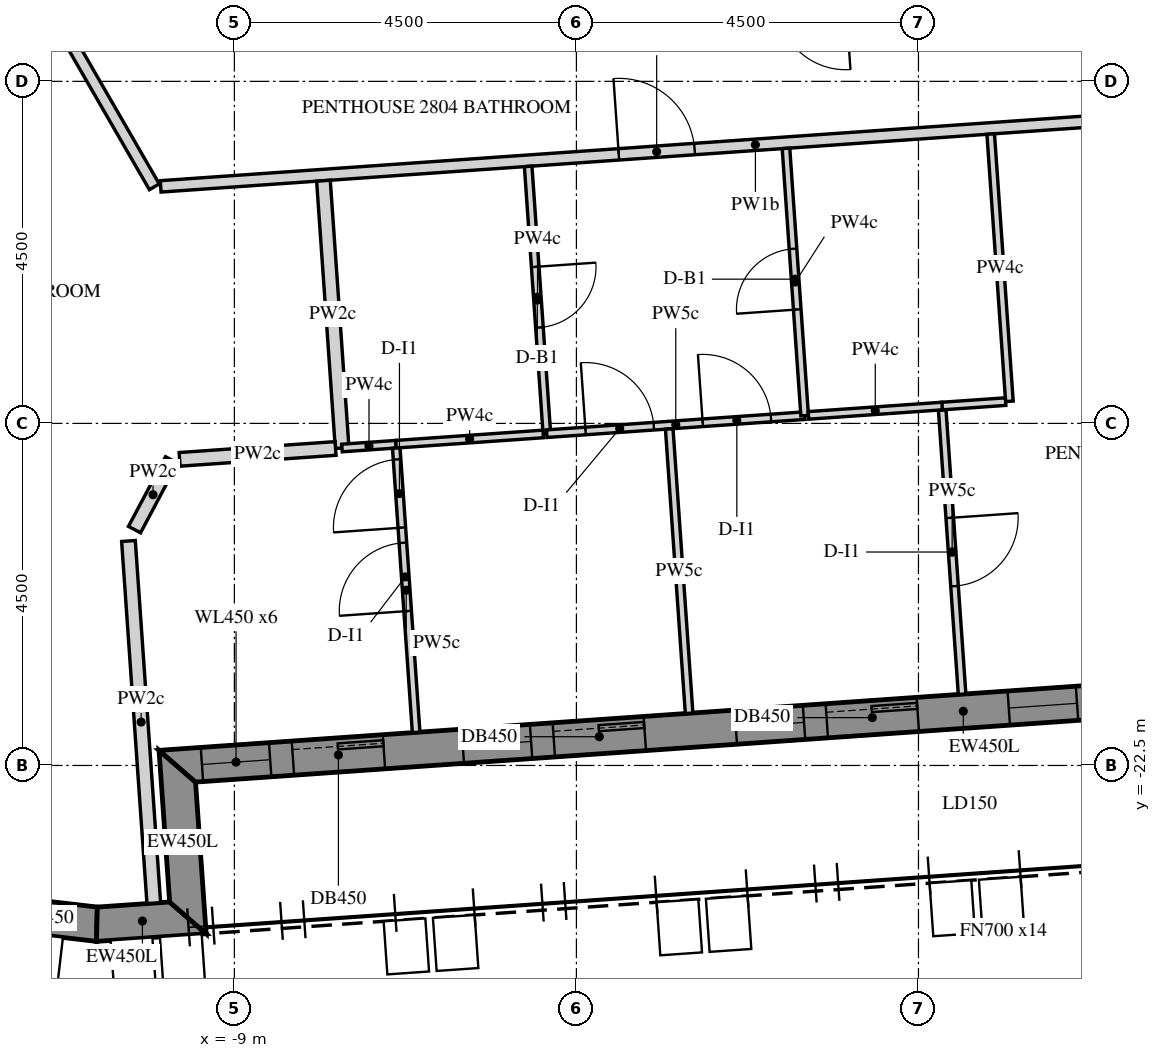
"""IFC4 building model, lengths in metres.
Left out: names, types, materials, properties, quantities, classifications, styles, units other than length and angle.
Written with IfcOpenShell. Run it as: python <this file> out.ifc"""

import sys

from ifc_helpers import new_model, si_unit, direction, frame, frame_2d, origin, place, context, subcontext, project, spatial, polyline, rectangle, outline, extrude, element, fill, save


model = new_model("IFC4")
c1 = context("Model", 3, precision=1e-05, world=origin(), true_north=direction((0.0, 1.0)))
c2 = subcontext(c1, "Body", "Model", "MODEL_VIEW")
j1 = project(units=[si_unit("LENGTHUNIT", "METRE"), si_unit("PLANEANGLEUNIT", "RADIAN")], contexts=[c1])
p1 = place(None, origin())
s1 = spatial("IfcSite", under=j1, at=p1, CompositionType="ELEMENT")
p2 = place(p1, origin())
s2 = spatial("IfcBuilding", under=s1, at=p2, CompositionType="ELEMENT")
p3 = place(p2, frame((0.0, 0.0, 361.2)))
s3 = spatial("IfcBuildingStorey", under=s2, at=p3, CompositionType="ELEMENT", Elevation=361.2)
p4 = place(p3, frame((-12.197, -24.427, -0.15), z_axis=(0.0, 0.0, 1.0), x_axis=(0.993227902261, -0.116182331575, 0.0)))
e1 = element("IfcWall", 1, at=p4, inside=s3, PredefinedType="SOLIDWALL", context=c2, shape_type="SweptSolid", body=[
    extrude(outline(polyline([(-0.042, -0.225), (1.418, -0.225), (1.376, 0.225), (0.042, 0.225), (-0.042, -0.225)])), origin(), (0.0, 0.0, 1.0), 3.9),
])
p5 = place(p3, frame((-10.809, -24.589, -0.15), z_axis=(0.0, 0.0, 1.0), x_axis=(0.997562933087, 0.069772448216, 0.0)))
e2 = element("IfcWall", 2, at=p5, inside=s3, PredefinedType="SOLIDWALL", context=c2, shape_type="SweptSolid", body=[
    extrude(outline(polyline([(-0.021, -0.225), (1.425, -0.225), (0.975, 0.225), (0.021, 0.225), (-0.021, -0.225)])), origin(), (0.0, 0.0, 1.0), 3.9),
])
p6 = place(p3, frame((-9.611, -24.505, -0.15), z_axis=(0.0, 0.0, 1.0), x_axis=(-0.069824268692, 0.99755930726, 0.0)))
e3 = element("IfcWall", 3, at=p6, inside=s3, PredefinedType="SOLIDWALL", context=c2, shape_type="SweptSolid", body=[
    extrude(outline(polyline([(-0.225, -0.225), (1.775, -0.225), (2.225, 0.225), (0.225, 0.225), (-0.225, -0.225)])), origin(), (0.0, 0.0, 1.0), 3.9),
])
p7 = place(p3, frame((-9.751, -22.51, -0.15), z_axis=(0.0, 0.0, 1.0), x_axis=(0.997564460173, 0.06975061147, 0.0)))
e4 = element("IfcWall", 4, at=p7, inside=s3, PredefinedType="SOLIDWALL", context=c2, shape_type="SweptSolid", body=[
    extrude(outline(polyline([(0.225, -0.225), (20.507, -0.225), (20.957, 0.225), (-0.225, 0.225), (0.225, -0.225)])), origin(), (0.0, 0.0, 1.0), 3.9),
])
p8 = place(p7, frame((0.325, 0.0, 1.05)))
e5 = element("IfcOpeningElement", 5, at=p8, cuts=e4, PredefinedType="OPENING", context=c2, shape_type="SweptSolid", body=[
    extrude(rectangle(XDim=0.9, YDim=1.5, at=frame_2d((0.45, 0.75))), frame((0.0, 0.235, 0.0), z_axis=(0.0, -1.0, 0.0), x_axis=(1.0, 0.0, 0.0)), (0.0, 0.0, 1.0), 0.47),
])
p9 = place(p7, frame((1.525, 0.0, 0.15)))
e6 = element("IfcOpeningElement", 6, at=p9, cuts=e4, PredefinedType="OPENING", context=c2, shape_type="SweptSolid", body=[
    extrude(rectangle(XDim=1.2, YDim=2.4, at=frame_2d((0.6, 1.2))), frame((0.0, 0.235, 0.0), z_axis=(0.0, -1.0, 0.0), x_axis=(1.0, 0.0, 0.0)), (0.0, 0.0, 1.0), 0.47),
])
p10 = place(p7, frame((3.766, 0.0, 1.05)))
e7 = element("IfcOpeningElement", 7, at=p10, cuts=e4, PredefinedType="OPENING", context=c2, shape_type="SweptSolid", body=[
    extrude(rectangle(XDim=0.9, YDim=1.5, at=frame_2d((0.45, 0.75))), frame((0.0, 0.235, 0.0), z_axis=(0.0, -1.0, 0.0), x_axis=(1.0, 0.0, 0.0)), (0.0, 0.0, 1.0), 0.47),
])
p11 = place(p7, frame((4.966, 0.0, 0.15)))
e8 = element("IfcOpeningElement", 8, at=p11, cuts=e4, PredefinedType="OPENING", context=c2, shape_type="SweptSolid", body=[
    extrude(rectangle(XDim=1.2, YDim=2.4, at=frame_2d((0.6, 1.2))), frame((0.0, 0.235, 0.0), z_axis=(0.0, -1.0, 0.0), x_axis=(1.0, 0.0, 0.0)), (0.0, 0.0, 1.0), 0.47),
])
p12 = place(p7, frame((7.366, 0.0, 1.05)))
e9 = element("IfcOpeningElement", 9, at=p12, cuts=e4, PredefinedType="OPENING", context=c2, shape_type="SweptSolid", body=[
    extrude(rectangle(XDim=0.9, YDim=1.5, at=frame_2d((0.45, 0.75))), frame((0.0, 0.235, 0.0), z_axis=(0.0, -1.0, 0.0), x_axis=(1.0, 0.0, 0.0)), (0.0, 0.0, 1.0), 0.47),
])
p13 = place(p7, frame((8.566, 0.0, 0.15)))
e10 = element("IfcOpeningElement", 10, at=p13, cuts=e4, PredefinedType="OPENING", context=c2, shape_type="SweptSolid", body=[
    extrude(rectangle(XDim=1.2, YDim=2.4, at=frame_2d((0.6, 1.2))), frame((0.0, 0.235, 0.0), z_axis=(0.0, -1.0, 0.0), x_axis=(1.0, 0.0, 0.0)), (0.0, 0.0, 1.0), 0.47),
])
p14 = place(p7, frame((10.966, 0.0, 1.05)))
e11 = element("IfcOpeningElement", 11, at=p14, cuts=e4, PredefinedType="OPENING", context=c2, shape_type="SweptSolid", body=[
    extrude(rectangle(XDim=0.9, YDim=1.5, at=frame_2d((0.45, 0.75))), frame((0.0, 0.235, 0.0), z_axis=(0.0, -1.0, 0.0), x_axis=(1.0, 0.0, 0.0)), (0.0, 0.0, 1.0), 0.47),
])
p15 = place(p7, frame((12.166, 0.0, 0.15)))
e12 = element("IfcOpeningElement", 12, at=p15, cuts=e4, PredefinedType="OPENING", context=c2, shape_type="SweptSolid", body=[
    extrude(rectangle(XDim=1.2, YDim=2.4, at=frame_2d((0.6, 1.2))), frame((0.0, 0.235, 0.0), z_axis=(0.0, -1.0, 0.0), x_axis=(1.0, 0.0, 0.0)), (0.0, 0.0, 1.0), 0.47),
])
p16 = place(p7, frame((14.566, 0.0, 1.05)))
e13 = element("IfcOpeningElement", 13, at=p16, cuts=e4, PredefinedType="OPENING", context=c2, shape_type="SweptSolid", body=[
    extrude(rectangle(XDim=0.9, YDim=1.5, at=frame_2d((0.45, 0.75))), frame((0.0, 0.235, 0.0), z_axis=(0.0, -1.0, 0.0), x_axis=(1.0, 0.0, 0.0)), (0.0, 0.0, 1.0), 0.47),
])
p17 = place(p7, frame((15.766, 0.0, 0.15)))
e14 = element("IfcOpeningElement", 14, at=p17, cuts=e4, PredefinedType="OPENING", context=c2, shape_type="SweptSolid", body=[
    extrude(rectangle(XDim=1.2, YDim=2.4, at=frame_2d((0.6, 1.2))), frame((0.0, 0.235, 0.0), z_axis=(0.0, -1.0, 0.0), x_axis=(1.0, 0.0, 0.0)), (0.0, 0.0, 1.0), 0.47),
])
p18 = place(p7, frame((18.007, 0.0, 1.05)))
e15 = element("IfcOpeningElement", 15, at=p18, cuts=e4, PredefinedType="OPENING", context=c2, shape_type="SweptSolid", body=[
    extrude(rectangle(XDim=0.9, YDim=1.5, at=frame_2d((0.45, 0.75))), frame((0.0, 0.235, 0.0), z_axis=(0.0, -1.0, 0.0), x_axis=(1.0, 0.0, 0.0)), (0.0, 0.0, 1.0), 0.47),
])
p19 = place(p7, frame((19.207, 0.0, 0.15)))
e16 = element("IfcOpeningElement", 16, at=p19, cuts=e4, PredefinedType="OPENING", context=c2, shape_type="SweptSolid", body=[
    extrude(rectangle(XDim=1.2, YDim=2.4, at=frame_2d((0.6, 1.2))), frame((0.0, 0.235, 0.0), z_axis=(0.0, -1.0, 0.0), x_axis=(1.0, 0.0, 0.0)), (0.0, 0.0, 1.0), 0.47),
])
p20 = place(p3, frame((-17.036, -2.792, 0.0), z_axis=(0.0, 0.0, 1.0), x_axis=(0.500006428338, -0.86602169235, 0.0)))
e17 = element("IfcWall", 17, at=p20, inside=s3, PredefinedType="PARTITIONING", context=c2, shape_type="SweptSolid", body=[
    extrude(rectangle(XDim=13.966, YDim=0.15, at=frame_2d((6.983, 0.0))), origin(), (0.0, 0.0, 1.0), 2.82),
])
p21 = place(p20, frame((3.325, 0.0, 0.0)))
e18 = element("IfcOpeningElement", 18, at=p21, cuts=e17, PredefinedType="OPENING", context=c2, shape_type="SweptSolid", body=[
    extrude(rectangle(XDim=1.0, YDim=2.1, at=frame_2d((0.5, 1.05))), frame((0.0, 0.085, 0.0), z_axis=(0.0, -1.0, 0.0), x_axis=(1.0, 0.0, 0.0)), (0.0, 0.0, 1.0), 0.17),
])
p22 = place(p3, frame((-9.97, -14.882, 0.0), z_axis=(0.0, 0.0, 1.0), x_axis=(0.997564384496, 0.06975169378, 0.0)))
e19 = element("IfcWall", 19, at=p22, inside=s3, PredefinedType="PARTITIONING", context=c2, shape_type="SweptSolid", body=[
    extrude(rectangle(XDim=15.688, YDim=0.15, at=frame_2d((7.844, 0.0))), origin(), (0.0, 0.0, 1.0), 2.82),
])
p23 = place(p22, frame((6.042, 0.0, 0.0)))
e20 = element("IfcOpeningElement", 20, at=p23, cuts=e19, PredefinedType="OPENING", context=c2, shape_type="SweptSolid", body=[
    extrude(rectangle(XDim=1.0, YDim=2.1, at=frame_2d((0.5, 1.05))), frame((0.0, 0.085, 0.0), z_axis=(0.0, -1.0, 0.0), x_axis=(1.0, 0.0, 0.0)), (0.0, 0.0, 1.0), 0.17),
])
p24 = place(p3, frame((-7.582, -18.323, 0.0), z_axis=(0.0, 0.0, 1.0), x_axis=(-0.069745730407, 0.997564801449, 0.0)))
e21 = element("IfcWall", 21, at=p24, inside=s3, PredefinedType="PARTITIONING", context=c2, shape_type="SweptSolid", body=[
    extrude(rectangle(XDim=3.525, YDim=0.18, at=frame_2d((1.762, 0.0))), origin(), (0.0, 0.0, 1.0), 2.82),
])
p25 = place(p3, frame((-10.06, -24.311, 0.0), z_axis=(0.0, 0.0, 1.0), x_axis=(-0.069731958306, 0.997565764244, 0.0)))
e22 = element("IfcWall", 22, at=p25, inside=s3, PredefinedType="PARTITIONING", context=c2, shape_type="SweptSolid", body=[
    extrude(rectangle(XDim=4.776, YDim=0.18, at=frame_2d((2.388, 0.0))), origin(), (0.0, 0.0, 1.0), 2.82),
])
p26 = place(p3, frame((-10.314, -19.397, 0.0), z_axis=(0.0, 0.0, 1.0), x_axis=(0.469550580753, 0.882905573725, 0.0)))
e23 = element("IfcWall", 23, at=p26, inside=s3, PredefinedType="PARTITIONING", context=c2, shape_type="SweptSolid", body=[
    extrude(rectangle(XDim=1.038, YDim=0.18, at=frame_2d((0.519, 0.0))), origin(), (0.0, 0.0, 1.0), 2.82),
])
p27 = place(p3, frame((-9.72, -18.473, 0.0), z_axis=(0.0, 0.0, 1.0), x_axis=(0.997561859931, 0.069787789844, 0.0)))
e24 = element("IfcWall", 24, at=p27, inside=s3, PredefinedType="PARTITIONING", context=c2, shape_type="SweptSolid", body=[
    extrude(rectangle(XDim=2.057, YDim=0.18, at=frame_2d((1.029, 0.0))), origin(), (0.0, 0.0, 1.0), 2.82),
])
p28 = place(p3, frame((0.312, -17.822, 0.0), z_axis=(0.0, 0.0, 1.0), x_axis=(0.069789608916, -0.99756173267, 0.0)))
e25 = element("IfcWall", 25, at=p28, inside=s3, PredefinedType="PARTITIONING", context=c2, shape_type="SweptSolid", body=[
    extrude(rectangle(XDim=3.75, YDim=0.1, at=frame_2d((1.875, 0.0))), origin(), (0.0, 0.0, 1.0), 2.82),
])
p29 = place(p28, frame((1.425, 0.0, 0.0)))
e26 = element("IfcOpeningElement", 26, at=p29, cuts=e25, PredefinedType="OPENING", context=c2, shape_type="SweptSolid", body=[
    extrude(rectangle(XDim=0.9, YDim=2.1, at=frame_2d((0.45, 1.05))), frame((0.0, 0.06, 0.0), z_axis=(0.0, -1.0, 0.0), x_axis=(1.0, 0.0, 0.0)), (0.0, 0.0, 1.0), 0.12),
])
p30 = place(p3, frame((0.95, -14.193, 0.0), z_axis=(0.0, 0.0, 1.0), x_axis=(0.069745730407, -0.997564801449, 0.0)))
e27 = element("IfcWall", 27, at=p30, inside=s3, PredefinedType="PARTITIONING", context=c2, shape_type="SweptSolid", body=[
    extrude(rectangle(XDim=3.525, YDim=0.1, at=frame_2d((1.762, 0.0))), origin(), (0.0, 0.0, 1.0), 2.82),
])
p31 = place(p3, frame((1.146, -17.713, 0.0), z_axis=(0.0, 0.0, 1.0), x_axis=(-0.997553508491, -0.069907064713, 0.0)))
e28 = element("IfcWall", 28, at=p31, inside=s3, PredefinedType="PARTITIONING", context=c2, shape_type="SweptSolid", body=[
    extrude(rectangle(XDim=0.842, YDim=0.1, at=frame_2d((0.421, 0.0))), origin(), (0.0, 0.0, 1.0), 2.82),
])
p32 = place(p3, frame((-5.135, -14.619, 0.0), z_axis=(0.0, 0.0, 1.0), x_axis=(0.069814653895, -0.997559980202, 0.0)))
e29 = element("IfcWall", 29, at=p32, inside=s3, PredefinedType="PARTITIONING", context=c2, shape_type="SweptSolid", body=[
    extrude(rectangle(XDim=3.525, YDim=0.1, at=frame_2d((1.762, 0.0))), origin(), (0.0, 0.0, 1.0), 2.82),
])
p33 = place(p32, frame((1.325, 0.0, 0.0)))
e30 = element("IfcOpeningElement", 30, at=p33, cuts=e29, PredefinedType="OPENING", context=c2, shape_type="SweptSolid", body=[
    extrude(rectangle(XDim=0.8, YDim=2.1, at=frame_2d((0.4, 1.05))), frame((0.0, 0.06, 0.0), z_axis=(0.0, -1.0, 0.0), x_axis=(1.0, 0.0, 0.0)), (0.0, 0.0, 1.0), 0.12),
])
p34 = place(p3, frame((-4.891, -18.135, 0.0), z_axis=(0.0, 0.0, 1.0), x_axis=(0.997567103819, 0.069712792071, 0.0)))
e31 = element("IfcWall", 31, at=p34, inside=s3, PredefinedType="PARTITIONING", context=c2, shape_type="SweptSolid", body=[
    extrude(rectangle(XDim=3.404, YDim=0.1, at=frame_2d((1.702, 0.0))), origin(), (0.0, 0.0, 1.0), 2.82),
])
p35 = place(p34, frame((0.512, 0.0, 0.0)))
e32 = element("IfcOpeningElement", 32, at=p35, cuts=e31, PredefinedType="OPENING", context=c2, shape_type="SweptSolid", body=[
    extrude(rectangle(XDim=0.9, YDim=2.1, at=frame_2d((0.45, 1.05))), frame((0.0, 0.06, 0.0), z_axis=(0.0, -1.0, 0.0), x_axis=(1.0, 0.0, 0.0)), (0.0, 0.0, 1.0), 0.12),
])
p36 = place(p34, frame((2.057, 0.0, 0.0)))
e33 = element("IfcOpeningElement", 33, at=p36, cuts=e31, PredefinedType="OPENING", context=c2, shape_type="SweptSolid", body=[
    extrude(rectangle(XDim=0.9, YDim=2.1, at=frame_2d((0.45, 1.05))), frame((0.0, 0.06, 0.0), z_axis=(0.0, -1.0, 0.0), x_axis=(1.0, 0.0, 0.0)), (0.0, 0.0, 1.0), 0.12),
])
p37 = place(p3, frame((-1.497, -17.898, 0.0), z_axis=(0.0, 0.0, 1.0), x_axis=(-0.069745730407, 0.997564801449, 0.0)))
e34 = element("IfcWall", 34, at=p37, inside=s3, PredefinedType="PARTITIONING", context=c2, shape_type="SweptSolid", body=[
    extrude(rectangle(XDim=3.525, YDim=0.1, at=frame_2d((1.762, 0.0))), origin(), (0.0, 0.0, 1.0), 2.82),
])
p38 = place(p37, frame((1.4, 0.0, 0.0)))
e35 = element("IfcOpeningElement", 35, at=p38, cuts=e34, PredefinedType="OPENING", context=c2, shape_type="SweptSolid", body=[
    extrude(rectangle(XDim=0.8, YDim=2.1, at=frame_2d((0.4, 1.05))), frame((0.0, 0.06, 0.0), z_axis=(0.0, -1.0, 0.0), x_axis=(1.0, 0.0, 0.0)), (0.0, 0.0, 1.0), 0.12),
])
p39 = place(p3, frame((-7.584, -18.324, 0.0), z_axis=(0.0, 0.0, 1.0), x_axis=(0.997553473746, 0.06990756051, 0.0)))
e36 = element("IfcWall", 36, at=p39, inside=s3, PredefinedType="PARTITIONING", context=c2, shape_type="SweptSolid", body=[
    extrude(rectangle(XDim=0.712, YDim=0.1, at=frame_2d((0.356, 0.0))), origin(), (0.0, 0.0, 1.0), 2.82),
])
p40 = place(p3, frame((-6.874, -18.274, 0.0), z_axis=(0.0, 0.0, 1.0), x_axis=(0.997562294187, 0.069781582212, 0.0)))
e37 = element("IfcWall", 37, at=p40, inside=s3, PredefinedType="PARTITIONING", context=c2, shape_type="SweptSolid", body=[
    extrude(rectangle(XDim=1.942, YDim=0.1, at=frame_2d((0.971, 0.0))), origin(), (0.0, 0.0, 1.0), 2.82),
])
p41 = place(p3, frame((-6.609, -22.065, 0.0), z_axis=(0.0, 0.0, 1.0), x_axis=(-0.069729351823, 0.997565946439, 0.0)))
e38 = element("IfcWall", 38, at=p41, inside=s3, PredefinedType="PARTITIONING", context=c2, shape_type="SweptSolid", body=[
    extrude(rectangle(XDim=3.75, YDim=0.1, at=frame_2d((1.875, 0.0))), origin(), (0.0, 0.0, 1.0), 2.82),
])
p42 = place(p41, frame((2.7, 0.0, 0.0)))
e39 = element("IfcOpeningElement", 39, at=p42, cuts=e38, PredefinedType="OPENING", context=c2, shape_type="SweptSolid", body=[
    extrude(rectangle(XDim=0.9, YDim=2.1, at=frame_2d((0.45, 1.05))), frame((0.0, 0.06, 0.0), z_axis=(0.0, -1.0, 0.0), x_axis=(1.0, 0.0, 0.0)), (0.0, 0.0, 1.0), 0.12),
])
p43 = place(p41, frame((1.6, 0.0, 0.0)))
e40 = element("IfcOpeningElement", 40, at=p43, cuts=e38, PredefinedType="OPENING", context=c2, shape_type="SweptSolid", body=[
    extrude(rectangle(XDim=0.9, YDim=2.1, at=frame_2d((0.45, 1.05))), frame((0.0, 0.06, 0.0), z_axis=(0.0, -1.0, 0.0), x_axis=(1.0, 0.0, 0.0)), (0.0, 0.0, 1.0), 0.12),
])
p44 = place(p3, frame((-3.017, -21.814, 0.0), z_axis=(0.0, 0.0, 1.0), x_axis=(-0.069724823314, 0.997566262969, 0.0)))
e41 = element("IfcWall", 41, at=p44, inside=s3, PredefinedType="PARTITIONING", context=c2, shape_type="SweptSolid", body=[
    extrude(rectangle(XDim=3.75, YDim=0.1, at=frame_2d((1.875, 0.0))), origin(), (0.0, 0.0, 1.0), 2.82),
])
p45 = place(p3, frame((0.311, -17.771, 0.0), z_axis=(0.0, 0.0, 1.0), x_axis=(-0.997559642586, -0.069819477831, 0.0)))
e42 = element("IfcWall", 42, at=p45, inside=s3, PredefinedType="PARTITIONING", context=c2, shape_type="SweptSolid", body=[
    extrude(rectangle(XDim=1.762, YDim=0.1, at=frame_2d((0.881, 0.0))), origin(), (0.0, 0.0, 1.0), 2.82),
])
p46 = place(p8, frame((0.0, 0.155, 0.0)))
e43 = element("IfcWindow", 43, at=p46, inside=s3, PartitioningType="SINGLE_PANEL", PredefinedType="WINDOW", context=c2, shape_type="SweptSolid", body=[
    extrude(rectangle(XDim=0.9, YDim=1.5, at=frame_2d((0.45, 0.75))), frame((0.0, 0.03, 0.0), z_axis=(0.0, -1.0, 0.0), x_axis=(1.0, 0.0, 0.0)), (0.0, 0.0, 1.0), 0.06),
])
fill(e5, e43)
p47 = place(p9, frame((0.0, 0.15, 0.0)))
e44 = element("IfcDoor", 44, at=p47, inside=s3, OperationType="SLIDING_TO_LEFT", PredefinedType="DOOR", context=c2, shape_type="SweptSolid", body=[
    extrude(rectangle(XDim=1.2, YDim=2.4, at=frame_2d((0.6, 1.2))), frame((0.0, 0.025, 0.0), z_axis=(0.0, -1.0, 0.0), x_axis=(1.0, 0.0, 0.0)), (0.0, 0.0, 1.0), 0.05),
])
fill(e6, e44)
p48 = place(p10, frame((0.0, 0.155, 0.0)))
e45 = element("IfcWindow", 45, at=p48, inside=s3, PartitioningType="SINGLE_PANEL", PredefinedType="WINDOW", context=c2, shape_type="SweptSolid", body=[
    extrude(rectangle(XDim=0.9, YDim=1.5, at=frame_2d((0.45, 0.75))), frame((0.0, 0.03, 0.0), z_axis=(0.0, -1.0, 0.0), x_axis=(1.0, 0.0, 0.0)), (0.0, 0.0, 1.0), 0.06),
])
fill(e7, e45)
p49 = place(p11, frame((0.0, 0.15, 0.0)))
e46 = element("IfcDoor", 46, at=p49, inside=s3, OperationType="SLIDING_TO_LEFT", PredefinedType="DOOR", context=c2, shape_type="SweptSolid", body=[
    extrude(rectangle(XDim=1.2, YDim=2.4, at=frame_2d((0.6, 1.2))), frame((0.0, 0.025, 0.0), z_axis=(0.0, -1.0, 0.0), x_axis=(1.0, 0.0, 0.0)), (0.0, 0.0, 1.0), 0.05),
])
fill(e8, e46)
p50 = place(p12, frame((0.0, 0.155, 0.0)))
e47 = element("IfcWindow", 47, at=p50, inside=s3, PartitioningType="SINGLE_PANEL", PredefinedType="WINDOW", context=c2, shape_type="SweptSolid", body=[
    extrude(rectangle(XDim=0.9, YDim=1.5, at=frame_2d((0.45, 0.75))), frame((0.0, 0.03, 0.0), z_axis=(0.0, -1.0, 0.0), x_axis=(1.0, 0.0, 0.0)), (0.0, 0.0, 1.0), 0.06),
])
fill(e9, e47)
p51 = place(p13, frame((0.0, 0.15, 0.0)))
e48 = element("IfcDoor", 48, at=p51, inside=s3, OperationType="SLIDING_TO_LEFT", PredefinedType="DOOR", context=c2, shape_type="SweptSolid", body=[
    extrude(rectangle(XDim=1.2, YDim=2.4, at=frame_2d((0.6, 1.2))), frame((0.0, 0.025, 0.0), z_axis=(0.0, -1.0, 0.0), x_axis=(1.0, 0.0, 0.0)), (0.0, 0.0, 1.0), 0.05),
])
fill(e10, e48)
p52 = place(p14, frame((0.0, 0.155, 0.0)))
e49 = element("IfcWindow", 49, at=p52, inside=s3, PartitioningType="SINGLE_PANEL", PredefinedType="WINDOW", context=c2, shape_type="SweptSolid", body=[
    extrude(rectangle(XDim=0.9, YDim=1.5, at=frame_2d((0.45, 0.75))), frame((0.0, 0.03, 0.0), z_axis=(0.0, -1.0, 0.0), x_axis=(1.0, 0.0, 0.0)), (0.0, 0.0, 1.0), 0.06),
])
fill(e11, e49)
p53 = place(p23, origin())
e50 = element("IfcDoor", 50, at=p53, inside=s3, OperationType="SINGLE_SWING_LEFT", PredefinedType="DOOR", context=c2, shape_type="SweptSolid", body=[
    extrude(rectangle(XDim=1.0, YDim=2.1, at=frame_2d((0.5, 1.05))), frame((0.0, 0.025, 0.0), z_axis=(0.0, -1.0, 0.0), x_axis=(1.0, 0.0, 0.0)), (0.0, 0.0, 1.0), 0.05),
])
fill(e20, e50)
p54 = place(p33, origin())
e51 = element("IfcDoor", 51, at=p54, inside=s3, OperationType="SINGLE_SWING_RIGHT", PredefinedType="DOOR", context=c2, shape_type="SweptSolid", body=[
    extrude(rectangle(XDim=0.8, YDim=2.1, at=frame_2d((0.4, 1.05))), frame((0.0, 0.025, 0.0), z_axis=(0.0, -1.0, 0.0), x_axis=(1.0, 0.0, 0.0)), (0.0, 0.0, 1.0), 0.05),
])
fill(e30, e51)
p55 = place(p35, origin())
e52 = element("IfcDoor", 52, at=p55, inside=s3, OperationType="SINGLE_SWING_LEFT", PredefinedType="DOOR", context=c2, shape_type="SweptSolid", body=[
    extrude(rectangle(XDim=0.9, YDim=2.1, at=frame_2d((0.45, 1.05))), frame((0.0, 0.025, 0.0), z_axis=(0.0, -1.0, 0.0), x_axis=(1.0, 0.0, 0.0)), (0.0, 0.0, 1.0), 0.05),
])
fill(e32, e52)
p56 = place(p42, origin())
e53 = element("IfcDoor", 53, at=p56, inside=s3, OperationType="SINGLE_SWING_RIGHT", PredefinedType="DOOR", context=c2, shape_type="SweptSolid", body=[
    extrude(rectangle(XDim=0.9, YDim=2.1, at=frame_2d((0.45, 1.05))), frame((0.0, 0.025, 0.0), z_axis=(0.0, -1.0, 0.0), x_axis=(1.0, 0.0, 0.0)), (0.0, 0.0, 1.0), 0.05),
])
fill(e39, e53)
p57 = place(p43, origin())
e54 = element("IfcDoor", 54, at=p57, inside=s3, OperationType="SINGLE_SWING_LEFT", PredefinedType="DOOR", context=c2, shape_type="SweptSolid", body=[
    extrude(rectangle(XDim=0.9, YDim=2.1, at=frame_2d((0.45, 1.05))), frame((0.0, 0.025, 0.0), z_axis=(0.0, -1.0, 0.0), x_axis=(1.0, 0.0, 0.0)), (0.0, 0.0, 1.0), 0.05),
])
fill(e40, e54)
p58 = place(p36, origin())
e55 = element("IfcDoor", 55, at=p58, inside=s3, OperationType="SINGLE_SWING_LEFT", PredefinedType="DOOR", context=c2, shape_type="SweptSolid", body=[
    extrude(rectangle(XDim=0.9, YDim=2.1, at=frame_2d((0.45, 1.05))), frame((0.0, 0.025, 0.0), z_axis=(0.0, -1.0, 0.0), x_axis=(1.0, 0.0, 0.0)), (0.0, 0.0, 1.0), 0.05),
])
fill(e33, e55)
p59 = place(p38, origin())
e56 = element("IfcDoor", 56, at=p59, inside=s3, OperationType="SINGLE_SWING_LEFT", PredefinedType="DOOR", context=c2, shape_type="SweptSolid", body=[
    extrude(rectangle(XDim=0.8, YDim=2.1, at=frame_2d((0.4, 1.05))), frame((0.0, 0.025, 0.0), z_axis=(0.0, -1.0, 0.0), x_axis=(1.0, 0.0, 0.0)), (0.0, 0.0, 1.0), 0.05),
])
fill(e35, e56)
p60 = place(p29, origin())
e57 = element("IfcDoor", 57, at=p60, inside=s3, OperationType="SINGLE_SWING_LEFT", PredefinedType="DOOR", context=c2, shape_type="SweptSolid", body=[
    extrude(rectangle(XDim=0.9, YDim=2.1, at=frame_2d((0.45, 1.05))), frame((0.0, 0.025, 0.0), z_axis=(0.0, -1.0, 0.0), x_axis=(1.0, 0.0, 0.0)), (0.0, 0.0, 1.0), 0.05),
])
fill(e26, e57)
save(model, sys.argv[1])
